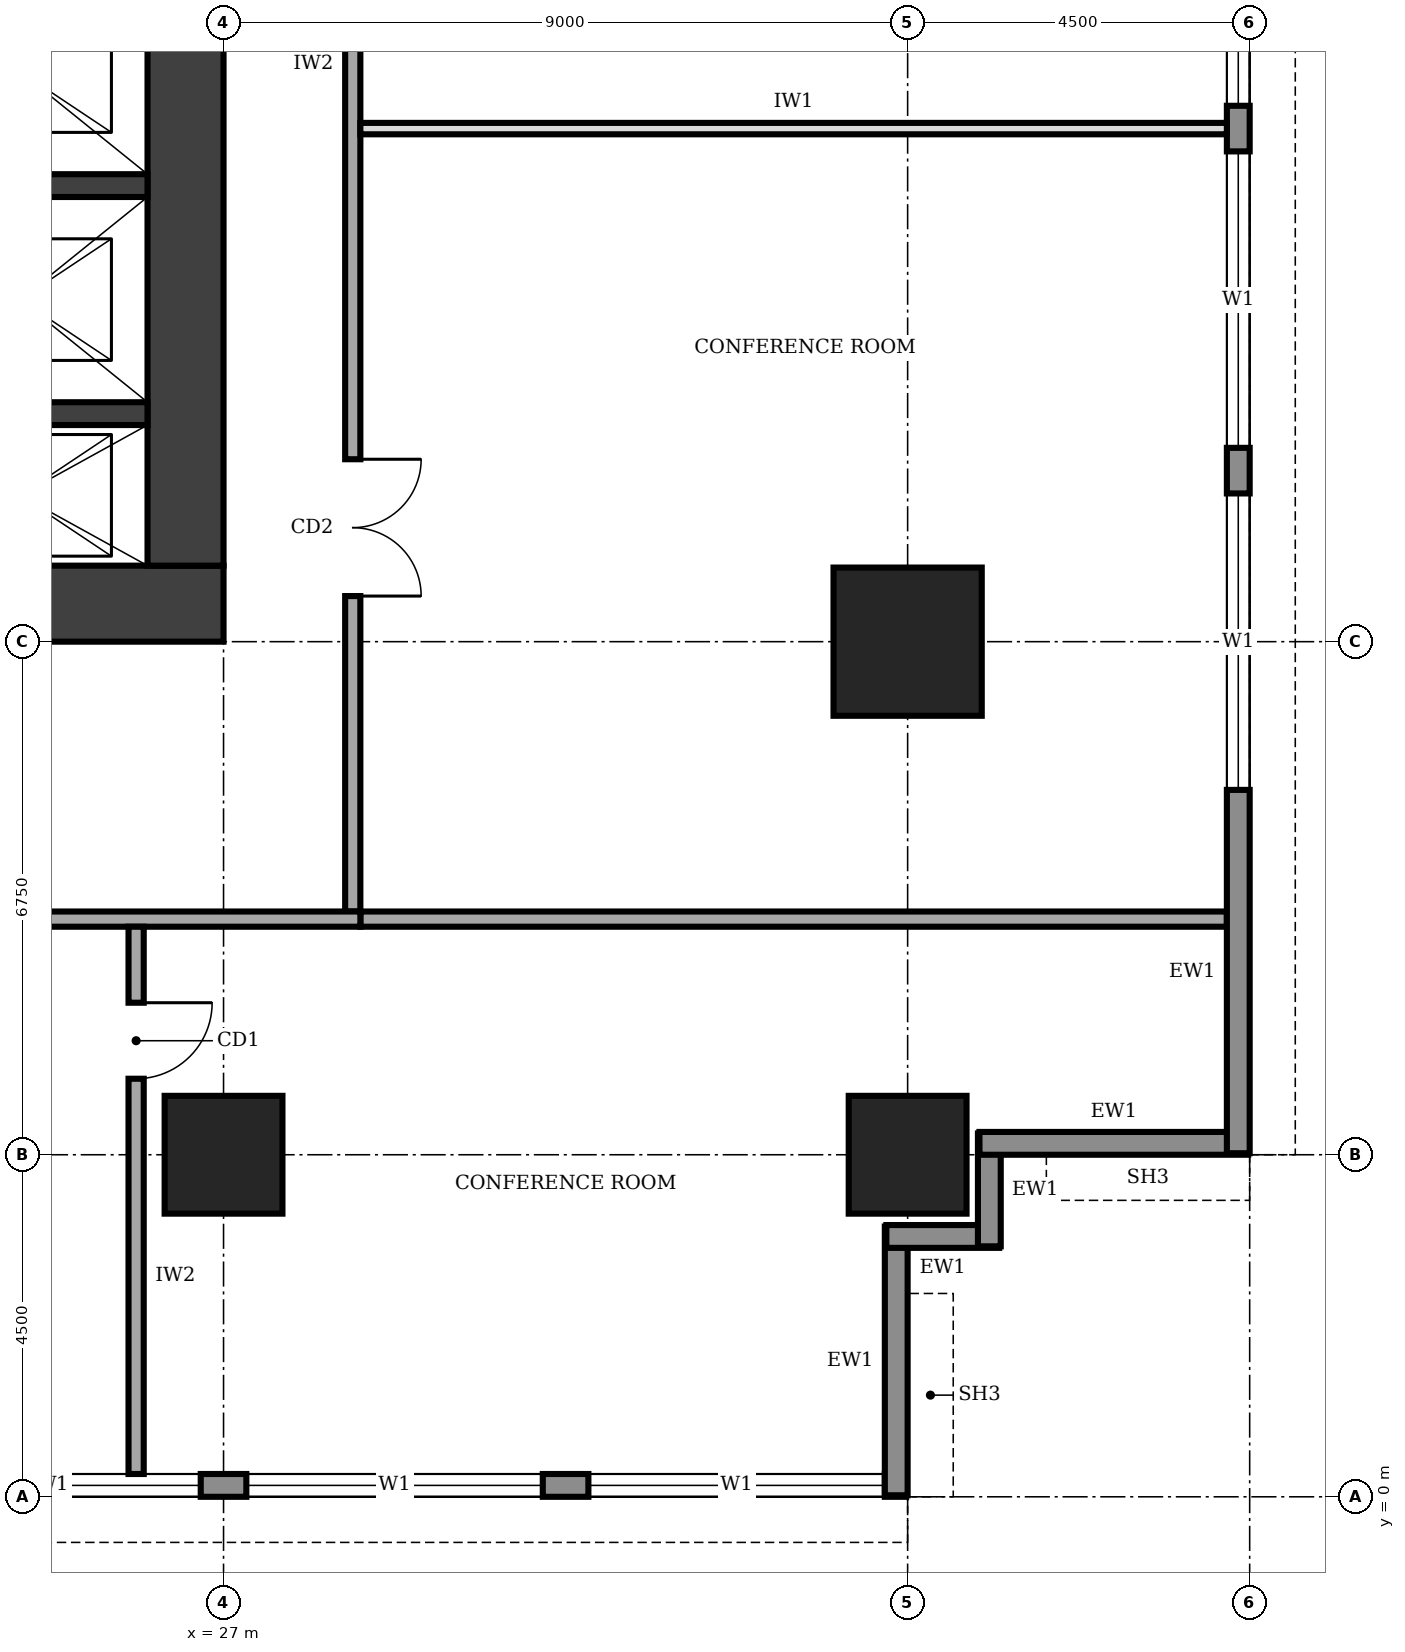
"""IFC4 building model, lengths in metres.
Left out: names, types, materials, properties, quantities, classifications, styles, units other than length and angle.
Written with IfcOpenShell. Run it as: python <this file> out.ifc"""

import sys

from ifc_helpers import new_model, si_unit, direction, frame, frame_2d, origin, origin_2d, place, context, subcontext, project, spatial, rectangle, extrude, element, fill, save


model = new_model("IFC4")
c1 = context("Model", 3, precision=1e-05, world=origin(), true_north=direction((0.0, 1.0)))
c2 = subcontext(c1, "Body", "Model", "MODEL_VIEW")
j1 = project(units=[si_unit("LENGTHUNIT", "METRE"), si_unit("PLANEANGLEUNIT", "RADIAN")], contexts=[c1])
p1 = place(None, origin())
s1 = spatial("IfcSite", under=j1, at=p1, CompositionType="ELEMENT")
p2 = place(p1, origin())
s2 = spatial("IfcBuilding", under=s1, at=p2, CompositionType="ELEMENT")
p3 = place(p2, frame((0.0, 0.0, 205.0)))
s3 = spatial("IfcBuildingStorey", under=s2, at=p3, CompositionType="ELEMENT", Elevation=205.0)
p4 = place(p3, frame((13.5, 11.75, 0.0), z_axis=(0.0, 0.0, 1.0), x_axis=(1.0, 0.0, 0.0)))
e1 = element("IfcWall", 1, at=p4, inside=s3, PredefinedType="SHEAR", context=c2, shape_type="SweptSolid", body=[
    extrude(rectangle(XDim=13.5, YDim=1.0, at=frame_2d((6.75, 0.0))), origin(), (0.0, 0.0, 1.0), 4.0),
])
p5 = place(p4, frame((4.75, 0.0, 0.0)))
e2 = element("IfcOpeningElement", 2, at=p5, cuts=e1, PredefinedType="OPENING", context=c2, shape_type="SweptSolid", body=[
    extrude(rectangle(XDim=1.0, YDim=2.1, at=frame_2d((0.5, 1.05))), frame((0.0, 0.51, 0.0), z_axis=(0.0, -1.0, 0.0), x_axis=(1.0, 0.0, 0.0)), (0.0, 0.0, 1.0), 1.02),
])
p6 = place(p3, frame((26.5, 12.25, 0.0), z_axis=(0.0, 0.0, 1.0), x_axis=(0.0, 1.0, 0.0)))
e3 = element("IfcWall", 3, at=p6, inside=s3, PredefinedType="SHEAR", context=c2, shape_type="SweptSolid", body=[
    extrude(rectangle(XDim=16.0, YDim=1.0, at=frame_2d((8.0, 0.0))), origin(), (0.0, 0.0, 1.0), 4.0),
])
for number, where, z_axis, x_axis in (
    (4, (22.65, 14.25, 0.0), (0.0, 0.0, 1.0), (1.0, 0.0, 0.0)),
    (5, (22.65, 17.25, 0.0), (0.0, 0.0, 1.0), (1.0, 0.0, 0.0)),
):
    element("IfcWall", number, at=place(p3, frame(where, z_axis=z_axis, x_axis=x_axis)), inside=s3, PredefinedType="SHEAR", context=c2, shape_type="SweptSolid", body=[
        extrude(rectangle(XDim=3.35, YDim=0.3, at=frame_2d((1.675, 0.0))), origin(), (0.0, 0.0, 1.0), 4.0),
    ])
for number, where, z_axis, x_axis in (
    (6, (27.0, 4.5, 0.0), (0.0, 0.0, 1.0), (1.0, 0.0, 0.0)),
    (7, (36.0, 4.5, 0.0), (0.0, 0.0, 1.0), (1.0, 0.0, 0.0)),
):
    element("IfcColumn", number, at=place(p3, frame(where, z_axis=z_axis, x_axis=x_axis)), inside=s3, PredefinedType="COLUMN", context=c2, shape_type="SweptSolid", body=[
        extrude(rectangle(XDim=1.55, YDim=1.55, at=origin_2d()), origin(), (0.0, 0.0, 1.0), 4.0),
    ])
p7 = place(p3, frame((36.0, 11.25, 0.0), z_axis=(0.0, 0.0, 1.0), x_axis=(1.0, 0.0, 0.0)))
e8 = element("IfcColumn", 8, at=p7, inside=s3, PredefinedType="COLUMN", context=c2, shape_type="SweptSolid", body=[
    extrude(rectangle(XDim=1.95, YDim=1.95, at=origin_2d()), origin(), (0.0, 0.0, 1.0), 4.0),
])
p8 = place(p3, frame((4.52, 0.15, 0.0), z_axis=(0.0, 0.0, 1.0), x_axis=(1.0, 0.0, 0.0)))
e9 = element("IfcWall", 9, at=p8, inside=s3, PredefinedType="STANDARD", context=c2, shape_type="SweptSolid", body=[
    extrude(rectangle(XDim=31.46, YDim=0.3, at=frame_2d((15.73, 0.0))), origin(), (0.0, 0.0, 1.0), 3.75),
])
p9 = place(p8, frame((4.78, 0.0, 0.9)))
e10 = element("IfcOpeningElement", 10, at=p9, cuts=e9, PredefinedType="OPENING", context=c2, shape_type="SweptSolid", body=[
    extrude(rectangle(XDim=3.9, YDim=2.2, at=frame_2d((1.95, 1.1))), frame((0.0, 0.16, 0.0), z_axis=(0.0, -1.0, 0.0), x_axis=(1.0, 0.0, 0.0)), (0.0, 0.0, 1.0), 0.32),
])
p10 = place(p8, frame((9.28, 0.0, 0.9)))
e11 = element("IfcOpeningElement", 11, at=p10, cuts=e9, PredefinedType="OPENING", context=c2, shape_type="SweptSolid", body=[
    extrude(rectangle(XDim=3.9, YDim=2.2, at=frame_2d((1.95, 1.1))), frame((0.0, 0.16, 0.0), z_axis=(0.0, -1.0, 0.0), x_axis=(1.0, 0.0, 0.0)), (0.0, 0.0, 1.0), 0.32),
])
p11 = place(p8, frame((13.78, 0.0, 0.9)))
e12 = element("IfcOpeningElement", 12, at=p11, cuts=e9, PredefinedType="OPENING", context=c2, shape_type="SweptSolid", body=[
    extrude(rectangle(XDim=3.9, YDim=2.2, at=frame_2d((1.95, 1.1))), frame((0.0, 0.16, 0.0), z_axis=(0.0, -1.0, 0.0), x_axis=(1.0, 0.0, 0.0)), (0.0, 0.0, 1.0), 0.32),
])
p12 = place(p8, frame((18.28, 0.0, 0.9)))
e13 = element("IfcOpeningElement", 13, at=p12, cuts=e9, PredefinedType="OPENING", context=c2, shape_type="SweptSolid", body=[
    extrude(rectangle(XDim=3.9, YDim=2.2, at=frame_2d((1.95, 1.1))), frame((0.0, 0.16, 0.0), z_axis=(0.0, -1.0, 0.0), x_axis=(1.0, 0.0, 0.0)), (0.0, 0.0, 1.0), 0.32),
])
p13 = place(p8, frame((22.78, 0.0, 0.9)))
e14 = element("IfcOpeningElement", 14, at=p13, cuts=e9, PredefinedType="OPENING", context=c2, shape_type="SweptSolid", body=[
    extrude(rectangle(XDim=3.9, YDim=2.2, at=frame_2d((1.95, 1.1))), frame((0.0, 0.16, 0.0), z_axis=(0.0, -1.0, 0.0), x_axis=(1.0, 0.0, 0.0)), (0.0, 0.0, 1.0), 0.32),
])
p14 = place(p8, frame((27.28, 0.0, 0.9)))
e15 = element("IfcOpeningElement", 15, at=p14, cuts=e9, PredefinedType="OPENING", context=c2, shape_type="SweptSolid", body=[
    extrude(rectangle(XDim=3.9, YDim=2.2, at=frame_2d((1.95, 1.1))), frame((0.0, 0.16, 0.0), z_axis=(0.0, -1.0, 0.0), x_axis=(1.0, 0.0, 0.0)), (0.0, 0.0, 1.0), 0.32),
])
p15 = place(p3, frame((35.85, 0.02, 0.0), z_axis=(0.0, 0.0, 1.0), x_axis=(0.0, 1.0, 0.0)))
e16 = element("IfcWall", 16, at=p15, inside=s3, PredefinedType="STANDARD", context=c2, shape_type="SweptSolid", body=[
    extrude(rectangle(XDim=3.535, YDim=0.3, at=frame_2d((1.768, 0.0))), origin(), (0.0, 0.0, 1.0), 2.85),
])
for number, where, z_axis, x_axis in (
    (17, (35.72, 3.425, 0.0), (0.0, 0.0, 1.0), (1.0, 0.0, 0.0)),
    (18, (37.075, 3.295, 0.0), (0.0, 0.0, 1.0), (0.0, 1.0, 0.0)),
):
    element("IfcWall", number, at=place(p3, frame(where, z_axis=z_axis, x_axis=x_axis)), inside=s3, PredefinedType="STANDARD", context=c2, shape_type="SweptSolid", body=[
        extrude(rectangle(XDim=1.485, YDim=0.3, at=frame_2d((0.743, 0.0))), origin(), (0.0, 0.0, 1.0), 3.75),
    ])
p16 = place(p3, frame((36.945, 4.65, 0.0), z_axis=(0.0, 0.0, 1.0), x_axis=(1.0, 0.0, 0.0)))
e19 = element("IfcWall", 19, at=p16, inside=s3, PredefinedType="STANDARD", context=c2, shape_type="SweptSolid", body=[
    extrude(rectangle(XDim=3.535, YDim=0.3, at=frame_2d((1.768, 0.0))), origin(), (0.0, 0.0, 1.0), 2.85),
])
p17 = place(p3, frame((40.35, 4.52, 0.0), z_axis=(0.0, 0.0, 1.0), x_axis=(0.0, 1.0, 0.0)))
e20 = element("IfcWall", 20, at=p17, inside=s3, PredefinedType="STANDARD", context=c2, shape_type="SweptSolid", body=[
    extrude(rectangle(XDim=31.46, YDim=0.3, at=frame_2d((15.73, 0.0))), origin(), (0.0, 0.0, 1.0), 3.75),
])
p18 = place(p17, frame((4.78, 0.0, 0.9)))
e21 = element("IfcOpeningElement", 21, at=p18, cuts=e20, PredefinedType="OPENING", context=c2, shape_type="SweptSolid", body=[
    extrude(rectangle(XDim=3.9, YDim=2.2, at=frame_2d((1.95, 1.1))), frame((0.0, 0.16, 0.0), z_axis=(0.0, -1.0, 0.0), x_axis=(1.0, 0.0, 0.0)), (0.0, 0.0, 1.0), 0.32),
])
p19 = place(p17, frame((9.28, 0.0, 0.9)))
e22 = element("IfcOpeningElement", 22, at=p19, cuts=e20, PredefinedType="OPENING", context=c2, shape_type="SweptSolid", body=[
    extrude(rectangle(XDim=3.9, YDim=2.2, at=frame_2d((1.95, 1.1))), frame((0.0, 0.16, 0.0), z_axis=(0.0, -1.0, 0.0), x_axis=(1.0, 0.0, 0.0)), (0.0, 0.0, 1.0), 0.32),
])
p20 = place(p17, frame((13.78, 0.0, 0.9)))
e23 = element("IfcOpeningElement", 23, at=p20, cuts=e20, PredefinedType="OPENING", context=c2, shape_type="SweptSolid", body=[
    extrude(rectangle(XDim=3.9, YDim=2.2, at=frame_2d((1.95, 1.1))), frame((0.0, 0.16, 0.0), z_axis=(0.0, -1.0, 0.0), x_axis=(1.0, 0.0, 0.0)), (0.0, 0.0, 1.0), 0.32),
])
p21 = place(p17, frame((18.28, 0.0, 0.9)))
e24 = element("IfcOpeningElement", 24, at=p21, cuts=e20, PredefinedType="OPENING", context=c2, shape_type="SweptSolid", body=[
    extrude(rectangle(XDim=3.9, YDim=2.2, at=frame_2d((1.95, 1.1))), frame((0.0, 0.16, 0.0), z_axis=(0.0, -1.0, 0.0), x_axis=(1.0, 0.0, 0.0)), (0.0, 0.0, 1.0), 0.32),
])
p22 = place(p17, frame((22.78, 0.0, 0.9)))
e25 = element("IfcOpeningElement", 25, at=p22, cuts=e20, PredefinedType="OPENING", context=c2, shape_type="SweptSolid", body=[
    extrude(rectangle(XDim=3.9, YDim=2.2, at=frame_2d((1.95, 1.1))), frame((0.0, 0.16, 0.0), z_axis=(0.0, -1.0, 0.0), x_axis=(1.0, 0.0, 0.0)), (0.0, 0.0, 1.0), 0.32),
])
p23 = place(p17, frame((27.28, 0.0, 0.9)))
e26 = element("IfcOpeningElement", 26, at=p23, cuts=e20, PredefinedType="OPENING", context=c2, shape_type="SweptSolid", body=[
    extrude(rectangle(XDim=3.9, YDim=2.2, at=frame_2d((1.95, 1.1))), frame((0.0, 0.16, 0.0), z_axis=(0.0, -1.0, 0.0), x_axis=(1.0, 0.0, 0.0)), (0.0, 0.0, 1.0), 0.32),
])
p24 = place(p3, frame((11.9, 7.6, 0.0), z_axis=(0.0, 0.0, 1.0), x_axis=(1.0, 0.0, 0.0)))
e27 = element("IfcWall", 27, at=p24, inside=s3, PredefinedType="SOLIDWALL", context=c2, shape_type="SweptSolid", body=[
    extrude(rectangle(XDim=16.9, YDim=0.2, at=frame_2d((8.45, 0.0))), origin(), (0.0, 0.0, 1.0), 3.75),
])
p25 = place(p3, frame((28.7, 7.7, 0.0), z_axis=(0.0, 0.0, 1.0), x_axis=(0.0, 1.0, 0.0)))
e28 = element("IfcWall", 28, at=p25, inside=s3, PredefinedType="SOLIDWALL", context=c2, shape_type="SweptSolid", body=[
    extrude(rectangle(XDim=23.8, YDim=0.2, at=frame_2d((11.9, 0.0))), origin(), (0.0, 0.0, 1.0), 3.75),
])
p26 = place(p25, frame((4.15, 0.0, 0.0)))
e29 = element("IfcOpeningElement", 29, at=p26, cuts=e28, PredefinedType="OPENING", context=c2, shape_type="SweptSolid", body=[
    extrude(rectangle(XDim=1.8, YDim=2.1, at=frame_2d((0.9, 1.05))), frame((0.0, 0.11, 0.0), z_axis=(0.0, -1.0, 0.0), x_axis=(1.0, 0.0, 0.0)), (0.0, 0.0, 1.0), 0.22),
])
p27 = place(p25, frame((16.35, 0.0, 0.0)))
e30 = element("IfcOpeningElement", 30, at=p27, cuts=e28, PredefinedType="OPENING", context=c2, shape_type="SweptSolid", body=[
    extrude(rectangle(XDim=1.4, YDim=2.1, at=frame_2d((0.7, 1.05))), frame((0.0, 0.11, 0.0), z_axis=(0.0, -1.0, 0.0), x_axis=(1.0, 0.0, 0.0)), (0.0, 0.0, 1.0), 0.22),
])
p28 = place(p3, frame((25.85, 7.5, 0.0), z_axis=(0.0, 0.0, 1.0), x_axis=(0.0, -1.0, 0.0)))
e31 = element("IfcWall", 31, at=p28, inside=s3, PredefinedType="SOLIDWALL", context=c2, shape_type="SweptSolid", body=[
    extrude(rectangle(XDim=7.2, YDim=0.2, at=frame_2d((3.6, 0.0))), origin(), (0.0, 0.0, 1.0), 3.75),
])
p29 = place(p28, frame((1.0, 0.0, 0.0)))
e32 = element("IfcOpeningElement", 32, at=p29, cuts=e31, PredefinedType="OPENING", context=c2, shape_type="SweptSolid", body=[
    extrude(rectangle(XDim=1.0, YDim=2.1, at=frame_2d((0.5, 1.05))), frame((0.0, 0.11, 0.0), z_axis=(0.0, -1.0, 0.0), x_axis=(1.0, 0.0, 0.0)), (0.0, 0.0, 1.0), 0.22),
])
p30 = place(p3, frame((28.8, 7.6, 0.0), z_axis=(0.0, 0.0, 1.0), x_axis=(1.0, 0.0, 0.0)))
e33 = element("IfcWall", 33, at=p30, inside=s3, PredefinedType="SOLIDWALL", context=c2, shape_type="SweptSolid", body=[
    extrude(rectangle(XDim=11.4, YDim=0.2, at=frame_2d((5.7, 0.0))), origin(), (0.0, 0.0, 1.0), 3.75),
])
p31 = place(p3, frame((28.8, 18.0, 0.0), z_axis=(0.0, 0.0, 1.0), x_axis=(1.0, 0.0, 0.0)))
e34 = element("IfcWall", 34, at=p31, inside=s3, PredefinedType="PARTITIONING", context=c2, shape_type="SweptSolid", body=[
    extrude(rectangle(XDim=11.4, YDim=0.15, at=frame_2d((5.7, 0.0))), origin(), (0.0, 0.0, 1.0), 3.75),
])
p32 = place(p12, origin())
e35 = element("IfcWindow", 35, at=p32, inside=s3, PartitioningType="SINGLE_PANEL", PredefinedType="WINDOW", context=c2, shape_type="SweptSolid", body=[
    extrude(rectangle(XDim=3.9, YDim=2.2, at=frame_2d((1.95, 1.1))), frame((0.0, 0.03, 0.0), z_axis=(0.0, -1.0, 0.0), x_axis=(1.0, 0.0, 0.0)), (0.0, 0.0, 1.0), 0.06),
])
fill(e13, e35)
p33 = place(p13, origin())
e36 = element("IfcWindow", 36, at=p33, inside=s3, PartitioningType="SINGLE_PANEL", PredefinedType="WINDOW", context=c2, shape_type="SweptSolid", body=[
    extrude(rectangle(XDim=3.9, YDim=2.2, at=frame_2d((1.95, 1.1))), frame((0.0, 0.03, 0.0), z_axis=(0.0, -1.0, 0.0), x_axis=(1.0, 0.0, 0.0)), (0.0, 0.0, 1.0), 0.06),
])
fill(e14, e36)
p34 = place(p14, origin())
e37 = element("IfcWindow", 37, at=p34, inside=s3, PartitioningType="SINGLE_PANEL", PredefinedType="WINDOW", context=c2, shape_type="SweptSolid", body=[
    extrude(rectangle(XDim=3.9, YDim=2.2, at=frame_2d((1.95, 1.1))), frame((0.0, 0.03, 0.0), z_axis=(0.0, -1.0, 0.0), x_axis=(1.0, 0.0, 0.0)), (0.0, 0.0, 1.0), 0.06),
])
fill(e15, e37)
p35 = place(p18, origin())
e38 = element("IfcWindow", 38, at=p35, inside=s3, PartitioningType="SINGLE_PANEL", PredefinedType="WINDOW", context=c2, shape_type="SweptSolid", body=[
    extrude(rectangle(XDim=3.9, YDim=2.2, at=frame_2d((1.95, 1.1))), frame((0.0, 0.03, 0.0), z_axis=(0.0, -1.0, 0.0), x_axis=(1.0, 0.0, 0.0)), (0.0, 0.0, 1.0), 0.06),
])
fill(e21, e38)
p36 = place(p19, origin())
e39 = element("IfcWindow", 39, at=p36, inside=s3, PartitioningType="SINGLE_PANEL", PredefinedType="WINDOW", context=c2, shape_type="SweptSolid", body=[
    extrude(rectangle(XDim=3.9, YDim=2.2, at=frame_2d((1.95, 1.1))), frame((0.0, 0.03, 0.0), z_axis=(0.0, -1.0, 0.0), x_axis=(1.0, 0.0, 0.0)), (0.0, 0.0, 1.0), 0.06),
])
fill(e22, e39)
p37 = place(p20, origin())
e40 = element("IfcWindow", 40, at=p37, inside=s3, PartitioningType="SINGLE_PANEL", PredefinedType="WINDOW", context=c2, shape_type="SweptSolid", body=[
    extrude(rectangle(XDim=3.9, YDim=2.2, at=frame_2d((1.95, 1.1))), frame((0.0, 0.03, 0.0), z_axis=(0.0, -1.0, 0.0), x_axis=(1.0, 0.0, 0.0)), (0.0, 0.0, 1.0), 0.06),
])
fill(e23, e40)
p38 = place(p26, frame((1.8, 0.0, 0.0), z_axis=(0.0, 0.0, 1.0), x_axis=(-1.0, 0.0, 0.0)))
e41 = element("IfcDoor", 41, at=p38, inside=s3, OperationType="DOUBLE_DOOR_SINGLE_SWING", PredefinedType="DOOR", context=c2, shape_type="SweptSolid", body=[
    extrude(rectangle(XDim=1.8, YDim=2.1, at=frame_2d((0.9, 1.05))), frame((0.0, 0.025, 0.0), z_axis=(0.0, -1.0, 0.0), x_axis=(1.0, 0.0, 0.0)), (0.0, 0.0, 1.0), 0.05),
])
fill(e29, e41)
p39 = place(p29, origin())
e42 = element("IfcDoor", 42, at=p39, inside=s3, OperationType="SINGLE_SWING_LEFT", PredefinedType="DOOR", context=c2, shape_type="SweptSolid", body=[
    extrude(rectangle(XDim=1.0, YDim=2.1, at=frame_2d((0.5, 1.05))), frame((0.0, 0.025, 0.0), z_axis=(0.0, -1.0, 0.0), x_axis=(1.0, 0.0, 0.0)), (0.0, 0.0, 1.0), 0.05),
])
fill(e32, e42)
save(model, sys.argv[1])
